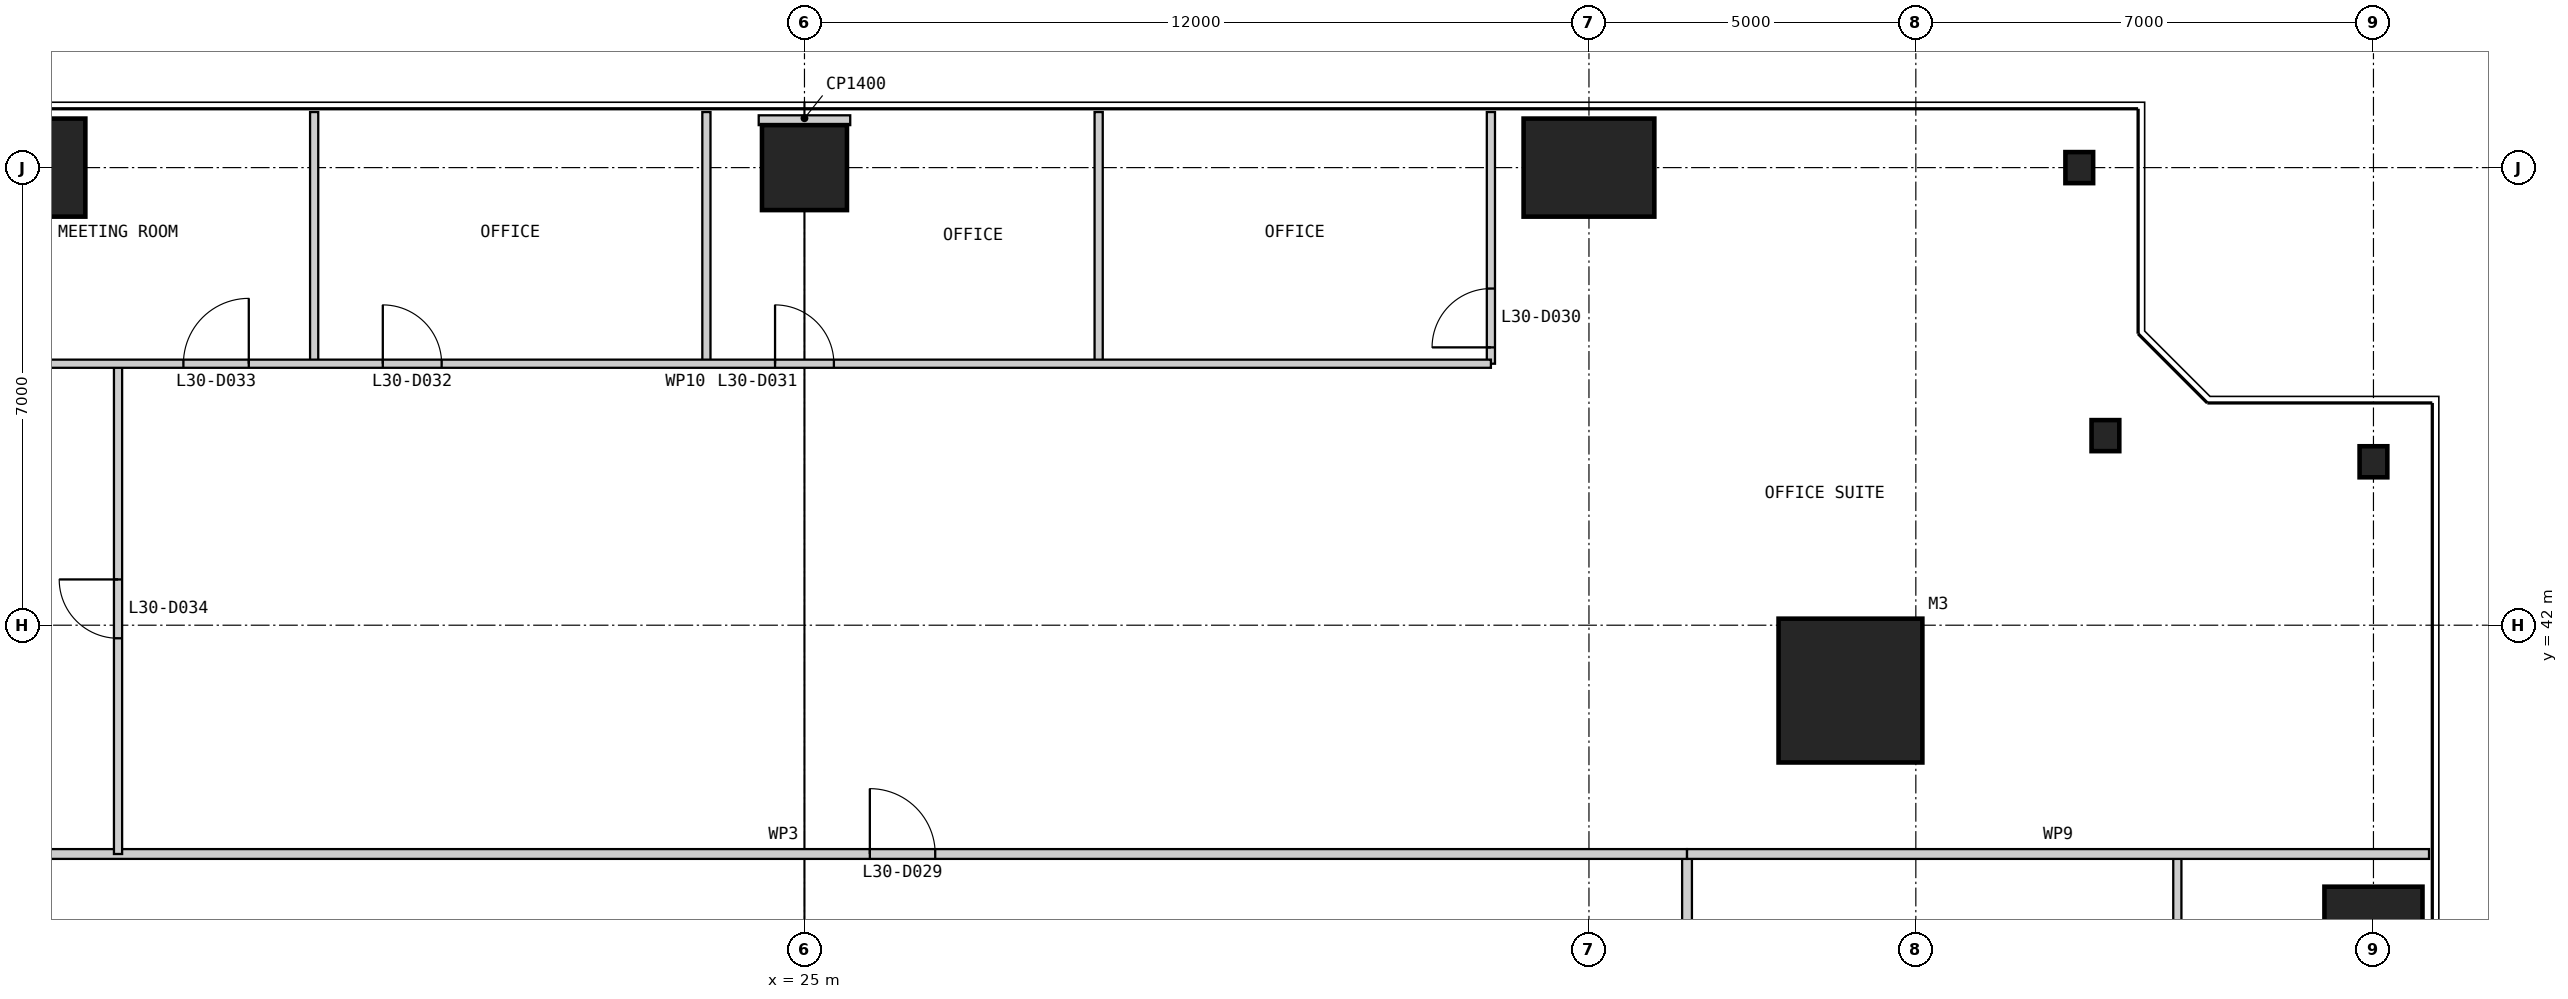
"""IFC4 building model, lengths in metres.
Left out: names, types, materials, properties, quantities, classifications, styles, units other than length and angle.
Written with IfcOpenShell. Run it as: python <this file> out.ifc"""

import sys

from ifc_helpers import new_model, si_unit, direction, frame, frame_2d, origin, origin_2d, place, context, subcontext, project, spatial, rectangle, i_section, extrude, element, fill, save


model = new_model("IFC4")
c1 = context("Model", 3, precision=1e-05, world=origin(), true_north=direction((0.0, 1.0)))
c2 = subcontext(c1, "Body", "Model", "MODEL_VIEW")
j1 = project(units=[si_unit("LENGTHUNIT", "METRE"), si_unit("PLANEANGLEUNIT", "RADIAN")], contexts=[c1])
p1 = place(None, origin())
s1 = spatial("IfcSite", under=j1, at=p1, CompositionType="ELEMENT")
p2 = place(p1, origin())
s2 = spatial("IfcBuilding", under=s1, at=p2, CompositionType="ELEMENT")
p3 = place(p2, frame((0.0, 0.0, 130.4)))
s3 = spatial("IfcBuildingStorey", under=s2, at=p3, CompositionType="ELEMENT", Elevation=130.4)
p4 = place(p3, frame((41.0, 41.0, 0.0), z_axis=(0.0, 0.0, 1.0), x_axis=(1.0, 0.0, 0.0)))
e1 = element("IfcColumn", 1, at=p4, inside=s3, PredefinedType="COLUMN", context=c2, shape_type="SweptSolid", body=[
    extrude(rectangle(XDim=2.2, YDim=2.2, at=origin_2d()), origin(), (0.0, 0.0, 1.0), 4.0),
])
p5 = place(p3, frame((49.0, 37.0, 0.0), z_axis=(0.0, 0.0, 1.0), x_axis=(1.0, 0.0, 0.0)))
e2 = element("IfcColumn", 2, at=p5, inside=s3, PredefinedType="COLUMN", context=c2, shape_type="SweptSolid", body=[
    extrude(rectangle(XDim=1.5, YDim=2.0, at=origin_2d()), origin(), (0.0, 0.0, 1.0), 4.0),
])
for number, where, z_axis, x_axis in (
    (3, (49.0, 44.5, 0.0), (0.0, 0.0, 1.0), (1.0, 0.0, 0.0)),
    (4, (44.9, 44.9, 0.0), (0.0, 0.0, 1.0), (1.0, 0.0, 0.0)),
    (5, (44.5, 49.0, 0.0), (0.0, 0.0, 1.0), (1.0, 0.0, 0.0)),
):
    element("IfcColumn", number, at=place(p3, frame(where, z_axis=z_axis, x_axis=x_axis)), inside=s3, PredefinedType="COLUMN", context=c2, shape_type="SweptSolid", body=[
        extrude(i_section(OverallWidth=0.424, OverallDepth=0.475, WebThickness=0.048, FlangeThickness=0.077, at=origin_2d()), origin(), (0.0, 0.0, 1.0), 4.0),
    ])
p6 = place(p3, frame((37.0, 49.0, 0.0), z_axis=(0.0, 0.0, 1.0), x_axis=(1.0, 0.0, 0.0)))
e6 = element("IfcColumn", 6, at=p6, inside=s3, PredefinedType="COLUMN", context=c2, shape_type="SweptSolid", body=[
    extrude(rectangle(XDim=2.0, YDim=1.5, at=origin_2d()), origin(), (0.0, 0.0, 1.0), 4.0),
])
p7 = place(p3, frame((25.0, 49.0, 0.0), z_axis=(0.0, 0.0, 1.0), x_axis=(1.0, 0.0, 0.0)))
e7 = element("IfcColumn", 7, at=p7, inside=s3, PredefinedType="COLUMN", context=c2, shape_type="SweptSolid", body=[
    extrude(rectangle(XDim=1.3, YDim=1.3, at=origin_2d()), origin(), (0.0, 0.0, 1.0), 4.0),
])
p8 = place(p3, frame((13.0, 49.0, 0.0), z_axis=(0.0, 0.0, 1.0), x_axis=(1.0, 0.0, 0.0)))
e8 = element("IfcColumn", 8, at=p8, inside=s3, PredefinedType="COLUMN", context=c2, shape_type="SweptSolid", body=[
    extrude(rectangle(XDim=2.0, YDim=1.5, at=origin_2d()), origin(), (0.0, 0.0, 1.0), 4.0),
])
p9 = place(p3, frame((38.5, 11.5, 0.0), z_axis=(0.0, 0.0, 1.0), x_axis=(0.0, 1.0, 0.0)))
e9 = element("IfcWall", 9, at=p9, inside=s3, PredefinedType="PARTITIONING", context=c2, shape_type="SweptSolid", body=[
    extrude(rectangle(XDim=27.0, YDim=0.15, at=frame_2d((13.5, 0.0))), origin(), (0.0, 0.0, 1.0), 3.85),
])
p10 = place(p9, frame((13.0, 0.0, 0.0)))
e10 = element("IfcOpeningElement", 10, at=p10, cuts=e9, PredefinedType="OPENING", context=c2, shape_type="SweptSolid", body=[
    extrude(rectangle(XDim=1.0, YDim=2.2, at=frame_2d((0.5, 1.1))), frame((0.0, 0.085, 0.0), z_axis=(0.0, -1.0, 0.0), x_axis=(1.0, 0.0, 0.0)), (0.0, 0.0, 1.0), 0.17),
])
p11 = place(p3, frame((46.0, 14.5, 0.0), z_axis=(0.0, 0.0, 1.0), x_axis=(0.0, 1.0, 0.0)))
e11 = element("IfcWall", 11, at=p11, inside=s3, PredefinedType="PARTITIONING", context=c2, shape_type="SweptSolid", body=[
    extrude(rectangle(XDim=24.0, YDim=0.125, at=frame_2d((12.0, 0.0))), origin(), (0.0, 0.0, 1.0), 3.238),
])
p12 = place(p11, frame((4.05, 0.0, 0.0)))
e12 = element("IfcOpeningElement", 12, at=p12, cuts=e11, PredefinedType="OPENING", context=c2, shape_type="SweptSolid", body=[
    extrude(rectangle(XDim=0.9, YDim=2.2, at=frame_2d((0.45, 1.1))), frame((0.0, 0.073, 0.0), z_axis=(0.0, -1.0, 0.0), x_axis=(1.0, 0.0, 0.0)), (0.0, 0.0, 1.0), 0.145),
])
p13 = place(p11, frame((10.05, 0.0, 0.0)))
e13 = element("IfcOpeningElement", 13, at=p13, cuts=e11, PredefinedType="OPENING", context=c2, shape_type="SweptSolid", body=[
    extrude(rectangle(XDim=0.9, YDim=2.2, at=frame_2d((0.45, 1.1))), frame((0.0, 0.073, 0.0), z_axis=(0.0, -1.0, 0.0), x_axis=(1.0, 0.0, 0.0)), (0.0, 0.0, 1.0), 0.145),
])
p14 = place(p11, frame((16.05, 0.0, 0.0)))
e14 = element("IfcOpeningElement", 14, at=p14, cuts=e11, PredefinedType="OPENING", context=c2, shape_type="SweptSolid", body=[
    extrude(rectangle(XDim=0.9, YDim=2.2, at=frame_2d((0.45, 1.1))), frame((0.0, 0.073, 0.0), z_axis=(0.0, -1.0, 0.0), x_axis=(1.0, 0.0, 0.0)), (0.0, 0.0, 1.0), 0.145),
])
p15 = place(p11, frame((19.05, 0.0, 0.0)))
e15 = element("IfcOpeningElement", 15, at=p15, cuts=e11, PredefinedType="OPENING", context=c2, shape_type="SweptSolid", body=[
    extrude(rectangle(XDim=0.9, YDim=2.2, at=frame_2d((0.45, 1.1))), frame((0.0, 0.073, 0.0), z_axis=(0.0, -1.0, 0.0), x_axis=(1.0, 0.0, 0.0)), (0.0, 0.0, 1.0), 0.145),
])
p16 = place(p3, frame((38.5, 38.5, 0.0), z_axis=(0.0, 0.0, 1.0), x_axis=(-1.0, 0.0, 0.0)))
e16 = element("IfcWall", 16, at=p16, inside=s3, PredefinedType="PARTITIONING", context=c2, shape_type="SweptSolid", body=[
    extrude(rectangle(XDim=27.0, YDim=0.15, at=frame_2d((13.5, 0.0))), origin(), (0.0, 0.0, 1.0), 3.85),
])
p17 = place(p16, frame((11.5, 0.0, 0.0)))
e17 = element("IfcOpeningElement", 17, at=p17, cuts=e16, PredefinedType="OPENING", context=c2, shape_type="SweptSolid", body=[
    extrude(rectangle(XDim=1.0, YDim=2.2, at=frame_2d((0.5, 1.1))), frame((0.0, 0.085, 0.0), z_axis=(0.0, -1.0, 0.0), x_axis=(1.0, 0.0, 0.0)), (0.0, 0.0, 1.0), 0.17),
])
p18 = place(p3, frame((49.85, 38.5, 0.0), z_axis=(0.0, 0.0, 1.0), x_axis=(-1.0, 0.0, 0.0)))
e18 = element("IfcWall", 18, at=p18, inside=s3, PredefinedType="PARTITIONING", context=c2, shape_type="SweptSolid", body=[
    extrude(rectangle(XDim=11.35, YDim=0.15, at=frame_2d((5.675, 0.0))), origin(), (0.0, 0.0, 1.0), 3.85),
])
p19 = place(p3, frame((35.5, 49.85, 0.0), z_axis=(0.0, 0.0, 1.0), x_axis=(0.0, -1.0, 0.0)))
e19 = element("IfcWall", 19, at=p19, inside=s3, PredefinedType="PARTITIONING", context=c2, shape_type="SweptSolid", body=[
    extrude(rectangle(XDim=3.85, YDim=0.125, at=frame_2d((1.925, 0.0))), origin(), (0.0, 0.0, 1.0), 3.85),
])
p20 = place(p19, frame((2.7, 0.0, 0.0)))
e20 = element("IfcOpeningElement", 20, at=p20, cuts=e19, PredefinedType="OPENING", context=c2, shape_type="SweptSolid", body=[
    extrude(rectangle(XDim=0.9, YDim=2.2, at=frame_2d((0.45, 1.1))), frame((0.0, 0.073, 0.0), z_axis=(0.0, -1.0, 0.0), x_axis=(1.0, 0.0, 0.0)), (0.0, 0.0, 1.0), 0.145),
])
for number, where, z_axis, x_axis in (
    (21, (29.5, 49.85, 0.0), (0.0, 0.0, 1.0), (0.0, -1.0, 0.0)),
    (22, (23.5, 49.85, 0.0), (0.0, 0.0, 1.0), (0.0, -1.0, 0.0)),
    (23, (17.5, 49.85, 0.0), (0.0, 0.0, 1.0), (0.0, -1.0, 0.0)),
):
    element("IfcWall", number, at=place(p3, frame(where, z_axis=z_axis, x_axis=x_axis)), inside=s3, PredefinedType="PARTITIONING", context=c2, shape_type="SweptSolid", body=[
        extrude(rectangle(XDim=3.85, YDim=0.125, at=frame_2d((1.925, 0.0))), origin(), (0.0, 0.0, 1.0), 3.85),
    ])
p21 = place(p3, frame((14.5, 46.0, 0.0), z_axis=(0.0, 0.0, 1.0), x_axis=(0.0, -1.0, 0.0)))
e24 = element("IfcWall", 24, at=p21, inside=s3, PredefinedType="PARTITIONING", context=c2, shape_type="SweptSolid", body=[
    extrude(rectangle(XDim=7.5, YDim=0.125, at=frame_2d((3.75, 0.0))), origin(), (0.0, 0.0, 1.0), 3.85),
])
p22 = place(p21, frame((3.3, 0.0, 0.0)))
e25 = element("IfcOpeningElement", 25, at=p22, cuts=e24, PredefinedType="OPENING", context=c2, shape_type="SweptSolid", body=[
    extrude(rectangle(XDim=0.9, YDim=2.2, at=frame_2d((0.45, 1.1))), frame((0.0, 0.073, 0.0), z_axis=(0.0, -1.0, 0.0), x_axis=(1.0, 0.0, 0.0)), (0.0, 0.0, 1.0), 0.145),
])
p23 = place(p3, frame((35.5, 46.0, 0.0), z_axis=(0.0, 0.0, 1.0), x_axis=(-1.0, 0.0, 0.0)))
e26 = element("IfcWall", 26, at=p23, inside=s3, PredefinedType="PARTITIONING", context=c2, shape_type="SweptSolid", body=[
    extrude(rectangle(XDim=24.0, YDim=0.125, at=frame_2d((12.0, 0.0))), origin(), (0.0, 0.0, 1.0), 3.85),
])
p24 = place(p23, frame((10.05, 0.0, 0.0)))
e27 = element("IfcOpeningElement", 27, at=p24, cuts=e26, PredefinedType="OPENING", context=c2, shape_type="SweptSolid", body=[
    extrude(rectangle(XDim=0.9, YDim=2.2, at=frame_2d((0.45, 1.1))), frame((0.0, 0.073, 0.0), z_axis=(0.0, -1.0, 0.0), x_axis=(1.0, 0.0, 0.0)), (0.0, 0.0, 1.0), 0.145),
])
p25 = place(p23, frame((16.05, 0.0, 0.0)))
e28 = element("IfcOpeningElement", 28, at=p25, cuts=e26, PredefinedType="OPENING", context=c2, shape_type="SweptSolid", body=[
    extrude(rectangle(XDim=0.9, YDim=2.2, at=frame_2d((0.45, 1.1))), frame((0.0, 0.073, 0.0), z_axis=(0.0, -1.0, 0.0), x_axis=(1.0, 0.0, 0.0)), (0.0, 0.0, 1.0), 0.145),
])
p26 = place(p23, frame((19.0, 0.0, 0.0)))
e29 = element("IfcOpeningElement", 29, at=p26, cuts=e26, PredefinedType="OPENING", context=c2, shape_type="SweptSolid", body=[
    extrude(rectangle(XDim=1.0, YDim=2.2, at=frame_2d((0.5, 1.1))), frame((0.0, 0.073, 0.0), z_axis=(0.0, -1.0, 0.0), x_axis=(1.0, 0.0, 0.0)), (0.0, 0.0, 1.0), 0.145),
])
p27 = place(p3, frame((25.0, 49.8, 0.0), z_axis=(0.0, 0.0, 1.0), x_axis=(0.0, -1.0, 0.0)))
e30 = element("IfcWall", 30, at=p27, inside=s3, PredefinedType="PARTITIONING", context=c2, shape_type="SweptSolid", body=[
    extrude(rectangle(XDim=0.15, YDim=1.4, at=frame_2d((0.075, 0.0))), origin(), (0.0, 0.0, 1.0), 3.85),
])
p28 = place(p17, frame((1.0, 0.0, 0.0), z_axis=(0.0, 0.0, 1.0), x_axis=(-1.0, 0.0, 0.0)))
e31 = element("IfcDoor", 31, at=p28, inside=s3, OperationType="SINGLE_SWING_LEFT", PredefinedType="DOOR", context=c2, shape_type="SweptSolid", body=[
    extrude(rectangle(XDim=1.0, YDim=2.2, at=frame_2d((0.5, 1.1))), frame((0.0, 0.025, 0.0), z_axis=(0.0, -1.0, 0.0), x_axis=(1.0, 0.0, 0.0)), (0.0, 0.0, 1.0), 0.05),
])
fill(e17, e31)
p29 = place(p20, frame((0.9, 0.0, 0.0), z_axis=(0.0, 0.0, 1.0), x_axis=(-1.0, 0.0, 0.0)))
e32 = element("IfcDoor", 32, at=p29, inside=s3, OperationType="SINGLE_SWING_LEFT", PredefinedType="DOOR", context=c2, shape_type="SweptSolid", body=[
    extrude(rectangle(XDim=0.9, YDim=2.2, at=frame_2d((0.45, 1.1))), frame((0.0, 0.025, 0.0), z_axis=(0.0, -1.0, 0.0), x_axis=(1.0, 0.0, 0.0)), (0.0, 0.0, 1.0), 0.05),
])
fill(e20, e32)
p30 = place(p24, frame((0.9, 0.0, 0.0), z_axis=(0.0, 0.0, 1.0), x_axis=(-1.0, 0.0, 0.0)))
e33 = element("IfcDoor", 33, at=p30, inside=s3, OperationType="SINGLE_SWING_LEFT", PredefinedType="DOOR", context=c2, shape_type="SweptSolid", body=[
    extrude(rectangle(XDim=0.9, YDim=2.2, at=frame_2d((0.45, 1.1))), frame((0.0, 0.025, 0.0), z_axis=(0.0, -1.0, 0.0), x_axis=(1.0, 0.0, 0.0)), (0.0, 0.0, 1.0), 0.05),
])
fill(e27, e33)
p31 = place(p25, frame((0.9, 0.0, 0.0), z_axis=(0.0, 0.0, 1.0), x_axis=(-1.0, 0.0, 0.0)))
e34 = element("IfcDoor", 34, at=p31, inside=s3, OperationType="SINGLE_SWING_LEFT", PredefinedType="DOOR", context=c2, shape_type="SweptSolid", body=[
    extrude(rectangle(XDim=0.9, YDim=2.2, at=frame_2d((0.45, 1.1))), frame((0.0, 0.025, 0.0), z_axis=(0.0, -1.0, 0.0), x_axis=(1.0, 0.0, 0.0)), (0.0, 0.0, 1.0), 0.05),
])
fill(e28, e34)
p32 = place(p26, frame((1.0, 0.0, 0.0), z_axis=(0.0, 0.0, 1.0), x_axis=(-1.0, 0.0, 0.0)))
e35 = element("IfcDoor", 35, at=p32, inside=s3, OperationType="SINGLE_SWING_RIGHT", PredefinedType="DOOR", context=c2, shape_type="SweptSolid", body=[
    extrude(rectangle(XDim=1.0, YDim=2.2, at=frame_2d((0.5, 1.1))), frame((0.0, 0.025, 0.0), z_axis=(0.0, -1.0, 0.0), x_axis=(1.0, 0.0, 0.0)), (0.0, 0.0, 1.0), 0.05),
])
fill(e29, e35)
p33 = place(p22, frame((0.9, 0.0, 0.0), z_axis=(0.0, 0.0, 1.0), x_axis=(-1.0, 0.0, 0.0)))
e36 = element("IfcDoor", 36, at=p33, inside=s3, OperationType="SINGLE_SWING_RIGHT", PredefinedType="DOOR", context=c2, shape_type="SweptSolid", body=[
    extrude(rectangle(XDim=0.9, YDim=2.2, at=frame_2d((0.45, 1.1))), frame((0.0, 0.025, 0.0), z_axis=(0.0, -1.0, 0.0), x_axis=(1.0, 0.0, 0.0)), (0.0, 0.0, 1.0), 0.05),
])
fill(e25, e36)
save(model, sys.argv[1])
